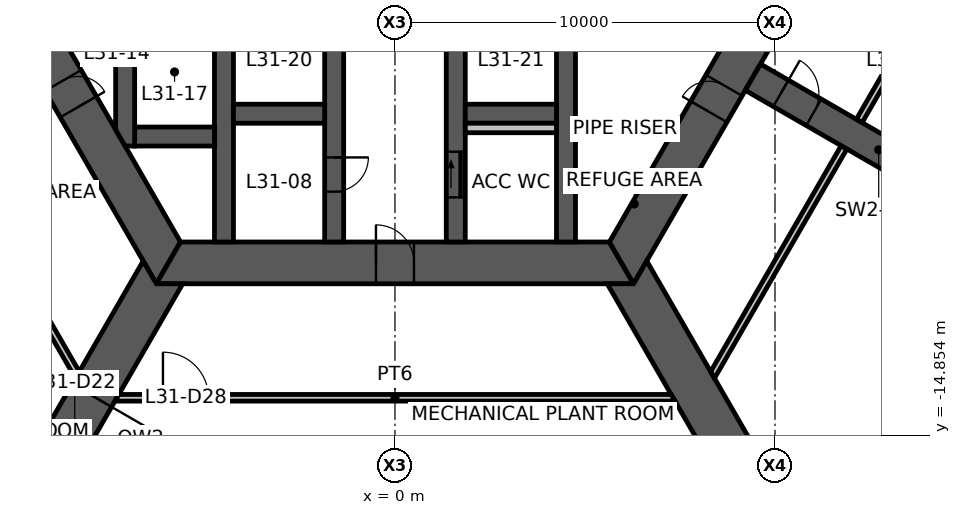
"""IFC4 building model, lengths in metres.
Left out: names, types, materials, properties, quantities, classifications, styles, units other than length and angle.
Written with IfcOpenShell. Run it as: python <this file> out.ifc"""

import sys

from ifc_helpers import new_model, si_unit, direction, frame, frame_2d, origin, place, context, subcontext, project, spatial, polyline, rectangle, outline, extrude, element, fill, save


model = new_model("IFC4")
c1 = context("Model", 3, precision=1e-05, world=origin(), true_north=direction((0.0, 1.0)))
c2 = subcontext(c1, "Body", "Model", "MODEL_VIEW")
j1 = project(units=[si_unit("LENGTHUNIT", "METRE"), si_unit("PLANEANGLEUNIT", "RADIAN")], contexts=[c1])
p1 = place(None, origin())
s1 = spatial("IfcSite", under=j1, at=p1, CompositionType="ELEMENT")
p2 = place(p1, origin())
s2 = spatial("IfcBuilding", under=s1, at=p2, CompositionType="ELEMENT")
p3 = place(p2, frame((0.0, 0.0, 123.6)))
s3 = spatial("IfcBuildingStorey", under=s2, at=p3, CompositionType="ELEMENT", Elevation=123.6)
p4 = place(p3, frame((-11.922, 0.0, 0.0), z_axis=(0.0, 0.0, 1.0), x_axis=(0.500004296715, -0.866022923061, 0.0)))
e1 = element("IfcWall", 1, at=p4, inside=s3, PredefinedType="SHEAR", context=c2, shape_type="SweptSolid", body=[
    extrude(outline(polyline([(-0.318, -0.55), (6.381, -0.55), (7.181, -0.55), (12.24, -0.55), (11.605, 0.55), (7.181, 0.55), (6.381, 0.55), (0.318, 0.55), (-0.318, -0.55)])), origin(), (0.0, 0.0, 1.0), 5.0),
])
p5 = place(p4, frame((6.381, 0.0, 0.0)))
e2 = element("IfcOpeningElement", 2, at=p5, cuts=e1, PredefinedType="OPENING", context=c2, shape_type="SweptSolid", body=[
    extrude(rectangle(XDim=0.8, YDim=2.1, at=frame_2d((0.4, 1.05))), frame((0.0, 0.56, 0.0), z_axis=(0.0, -1.0, 0.0), x_axis=(1.0, 0.0, 0.0)), (0.0, 0.0, 1.0), 1.12),
])
p6 = place(p3, frame((-5.961, -10.325, 0.0), z_axis=(0.0, 0.0, 1.0), x_axis=(1.0, 0.0, 0.0)))
e3 = element("IfcWall", 3, at=p6, inside=s3, PredefinedType="SHEAR", context=c2, shape_type="SweptSolid", body=[
    extrude(outline(polyline([(-0.318, -0.55), (5.461, -0.55), (6.461, -0.55), (12.24, -0.55), (11.605, 0.55), (6.461, 0.55), (5.461, 0.55), (0.318, 0.55), (-0.318, -0.55)])), origin(), (0.0, 0.0, 1.0), 5.0),
])
p7 = place(p6, frame((5.461, 0.0, 0.0)))
e4 = element("IfcOpeningElement", 4, at=p7, cuts=e3, PredefinedType="OPENING", context=c2, shape_type="SweptSolid", body=[
    extrude(rectangle(XDim=1.0, YDim=2.1, at=frame_2d((0.5, 1.05))), frame((0.0, 0.56, 0.0), z_axis=(0.0, -1.0, 0.0), x_axis=(1.0, 0.0, 0.0)), (0.0, 0.0, 1.0), 1.12),
])
p8 = place(p3, frame((5.961, -10.325, 0.0), z_axis=(0.0, 0.0, 1.0), x_axis=(0.500004296715, 0.866022923061, 0.0)))
e5 = element("IfcWall", 5, at=p8, inside=s3, PredefinedType="SHEAR", context=c2, shape_type="SweptSolid", body=[
    extrude(outline(polyline([(-0.318, -0.55), (4.594, -0.55), (5.394, -0.55), (12.24, -0.55), (11.605, 0.55), (5.394, 0.55), (4.594, 0.55), (0.318, 0.55), (-0.318, -0.55)])), origin(), (0.0, 0.0, 1.0), 5.0),
])
p9 = place(p8, frame((4.594, 0.0, 0.0)))
e6 = element("IfcOpeningElement", 6, at=p9, cuts=e5, PredefinedType="OPENING", context=c2, shape_type="SweptSolid", body=[
    extrude(rectangle(XDim=0.8, YDim=2.1, at=frame_2d((0.4, 1.05))), frame((0.0, 0.56, 0.0), z_axis=(0.0, -1.0, 0.0), x_axis=(1.0, 0.0, 0.0)), (0.0, 0.0, 1.0), 1.12),
])
p10 = place(p3, frame((9.418, -5.438, 0.0), z_axis=(0.0, 0.0, 1.0), x_axis=(0.866029782078, -0.499992416496, 0.0)))
e7 = element("IfcWall", 7, at=p10, inside=s3, PredefinedType="SHEAR", context=c2, shape_type="SweptSolid", body=[
    extrude(rectangle(XDim=7.646, YDim=0.8, at=frame_2d((3.823, 0.0))), origin(), (0.0, 0.0, 1.0), 5.0),
])
p11 = place(p10, frame((0.85, 0.0, 0.0)))
e8 = element("IfcOpeningElement", 8, at=p11, cuts=e7, PredefinedType="OPENING", context=c2, shape_type="SweptSolid", body=[
    extrude(rectangle(XDim=1.0, YDim=2.1, at=frame_2d((0.5, 1.05))), frame((0.0, 0.41, 0.0), z_axis=(0.0, -1.0, 0.0), x_axis=(1.0, 0.0, 0.0)), (0.0, 0.0, 1.0), 0.82),
])
p12 = place(p3, frame((-6.279, -10.875, -1.15), z_axis=(0.0, 0.0, 1.0), x_axis=(-0.50000923905, -0.866020069551, 0.0)))
e9 = element("IfcWall", 9, at=p12, inside=s3, PredefinedType="SHEAR", context=c2, shape_type="SweptSolid", body=[
    extrude(outline(polyline([(-0.346, -0.6), (3.395, -0.6), (5.195, -0.6), (7.443, -0.6), (7.443, 0.6), (5.195, 0.6), (3.395, 0.6), (-0.346, 0.6), (0.0, 0.0), (-0.346, -0.6)])), origin(), (0.0, 0.0, 1.0), 6.15),
])
p13 = place(p12, frame((3.395, 0.0, 1.15)))
e10 = element("IfcOpeningElement", 10, at=p13, cuts=e9, PredefinedType="OPENING", context=c2, shape_type="SweptSolid", body=[
    extrude(rectangle(XDim=1.8, YDim=2.4, at=frame_2d((0.9, 1.2))), frame((0.0, 0.61, 0.0), z_axis=(0.0, -1.0, 0.0), x_axis=(1.0, 0.0, 0.0)), (0.0, 0.0, 1.0), 1.22),
])
p14 = place(p3, frame((6.279, -10.875, -1.15), z_axis=(0.0, 0.0, 1.0), x_axis=(0.50000923905, -0.866020069551, 0.0)))
e11 = element("IfcWall", 11, at=p14, inside=s3, PredefinedType="SHEAR", context=c2, shape_type="SweptSolid", body=[
    extrude(outline(polyline([(-0.346, -0.6), (7.443, -0.6), (7.443, 0.6), (-0.346, 0.6), (0.0, 0.0), (-0.346, -0.6)])), origin(), (0.0, 0.0, 1.0), 6.15),
])
p15 = place(p3, frame((-1.6, -3.85, 0.0), z_axis=(0.0, 0.0, 1.0), x_axis=(0.0, -1.0, 0.0)))
e12 = element("IfcWall", 12, at=p15, inside=s3, PredefinedType="SHEAR", context=c2, shape_type="SweptSolid", body=[
    extrude(rectangle(XDim=5.925, YDim=0.5, at=frame_2d((2.962, 0.0))), origin(), (0.0, 0.0, 1.0), 5.0),
])
p16 = place(p15, frame((3.7, 0.0, 0.0)))
e13 = element("IfcOpeningElement", 13, at=p16, cuts=e12, PredefinedType="OPENING", context=c2, shape_type="SweptSolid", body=[
    extrude(rectangle(XDim=0.9, YDim=2.1, at=frame_2d((0.45, 1.05))), frame((0.0, 0.26, 0.0), z_axis=(0.0, -1.0, 0.0), x_axis=(1.0, 0.0, 0.0)), (0.0, 0.0, 1.0), 0.52),
])
p17 = place(p3, frame((1.6, -3.85, 0.0), z_axis=(0.0, 0.0, 1.0), x_axis=(0.0, -1.0, 0.0)))
e14 = element("IfcWall", 14, at=p17, inside=s3, PredefinedType="SHEAR", context=c2, shape_type="SweptSolid", body=[
    extrude(rectangle(XDim=5.925, YDim=0.5, at=frame_2d((2.962, 0.0))), origin(), (0.0, 0.0, 1.0), 5.0),
])
p18 = place(p17, frame((3.55, 0.0, 0.0)))
e15 = element("IfcOpeningElement", 15, at=p18, cuts=e14, PredefinedType="OPENING", context=c2, shape_type="SweptSolid", body=[
    extrude(rectangle(XDim=1.2, YDim=2.1, at=frame_2d((0.6, 1.05))), frame((0.0, 0.26, 0.0), z_axis=(0.0, -1.0, 0.0), x_axis=(1.0, 0.0, 0.0)), (0.0, 0.0, 1.0), 0.52),
])
for number, where, z_axis, x_axis in (
    (16, (-4.5, -3.85, 0.0), (0.0, 0.0, 1.0), (0.0, -1.0, 0.0)),
    (17, (4.5, -3.85, 0.0), (0.0, 0.0, 1.0), (0.0, -1.0, 0.0)),
):
    element("IfcWall", number, at=place(p3, frame(where, z_axis=z_axis, x_axis=x_axis)), inside=s3, PredefinedType="SHEAR", context=c2, shape_type="SweptSolid", body=[
        extrude(rectangle(XDim=5.925, YDim=0.5, at=frame_2d((2.962, 0.0))), origin(), (0.0, 0.0, 1.0), 5.0),
    ])
for number, where, z_axis, x_axis in (
    (18, (-4.25, -6.4, 0.0), (0.0, 0.0, 1.0), (1.0, 0.0, 0.0)),
    (19, (1.85, -6.4, 0.0), (0.0, 0.0, 1.0), (1.0, 0.0, 0.0)),
):
    element("IfcWall", number, at=place(p3, frame(where, z_axis=z_axis, x_axis=x_axis)), inside=s3, PredefinedType="SHEAR", context=c2, shape_type="SweptSolid", body=[
        extrude(rectangle(XDim=2.4, YDim=0.5, at=frame_2d((1.2, 0.0))), origin(), (0.0, 0.0, 1.0), 5.0),
    ])
p19 = place(p3, frame((-6.85, -7.0, 0.0), z_axis=(0.0, 0.0, 1.0), x_axis=(1.0, 0.0, 0.0)))
e20 = element("IfcWall", 20, at=p19, inside=s3, PredefinedType="SHEAR", context=c2, shape_type="SweptSolid", body=[
    extrude(rectangle(XDim=2.1, YDim=0.5, at=frame_2d((1.05, 0.0))), origin(), (0.0, 0.0, 1.0), 5.0),
])
p20 = place(p3, frame((-7.1, -3.85, 0.0), z_axis=(0.0, 0.0, 1.0), x_axis=(0.0, -1.0, 0.0)))
e21 = element("IfcWall", 21, at=p20, inside=s3, PredefinedType="SHEAR", context=c2, shape_type="SweptSolid", body=[
    extrude(outline(polyline([(0.0, -0.25), (2.969, -0.25), (3.4, 0.0), (3.4, 0.25), (0.0, 0.25), (0.0, -0.25)])), origin(), (0.0, 0.0, 1.0), 5.0),
])
p21 = place(p3, frame((1.85, -6.775, 0.0), z_axis=(0.0, 0.0, 1.0), x_axis=(1.0, 0.0, 0.0)))
e22 = element("IfcWall", 22, at=p21, inside=s3, PredefinedType="PLUMBINGWALL", context=c2, shape_type="SweptSolid", body=[
    extrude(rectangle(XDim=2.4, YDim=0.25, at=frame_2d((1.2, 0.0))), origin(), (0.0, 0.0, 1.0), 5.0),
])
p22 = place(p3, frame((-11.814, -7.288, 0.0), z_axis=(0.0, 0.0, 1.0), x_axis=(0.500005739714, -0.866022089933, 0.0)))
e23 = element("IfcWall", 23, at=p22, inside=s3, PredefinedType="PARTITIONING", context=c2, shape_type="SweptSolid", body=[
    extrude(outline(polyline([(0.0, -0.087), (1.9, -0.087), (3.1, -0.087), (6.964, -0.087), (6.863, 0.087), (3.1, 0.087), (1.9, 0.087), (0.0, 0.087), (0.0, -0.087)])), origin(), (0.0, 0.0, 1.0), 4.8),
])
p23 = place(p22, frame((1.9, 0.0, 0.0)))
e24 = element("IfcOpeningElement", 24, at=p23, cuts=e23, PredefinedType="OPENING", context=c2, shape_type="SweptSolid", body=[
    extrude(rectangle(XDim=1.2, YDim=2.1, at=frame_2d((0.6, 1.05))), frame((0.0, 0.098, 0.0), z_axis=(0.0, -1.0, 0.0), x_axis=(1.0, 0.0, 0.0)), (0.0, 0.0, 1.0), 0.195),
])
p24 = place(p3, frame((12.219, -6.587, 0.0), z_axis=(0.0, 0.0, 1.0), x_axis=(0.500005739714, 0.866022089933, 0.0)))
e25 = element("IfcWall", 25, at=p24, inside=s3, PredefinedType="PARTITIONING", context=c2, shape_type="SweptSolid", body=[
    extrude(outline(polyline([(0.0, -0.087), (1.9, -0.087), (3.1, -0.087), (6.964, -0.087), (6.863, 0.087), (3.1, 0.087), (1.9, 0.087), (0.0, 0.087), (0.0, -0.087)])), origin(), (0.0, 0.0, 1.0), 4.8),
])
p25 = place(p24, frame((1.9, 0.0, 0.0)))
e26 = element("IfcOpeningElement", 26, at=p25, cuts=e25, PredefinedType="OPENING", context=c2, shape_type="SweptSolid", body=[
    extrude(rectangle(XDim=1.2, YDim=2.1, at=frame_2d((0.6, 1.05))), frame((0.0, 0.098, 0.0), z_axis=(0.0, -1.0, 0.0), x_axis=(1.0, 0.0, 0.0)), (0.0, 0.0, 1.0), 0.195),
])
p26 = place(p3, frame((-7.318, -13.875, 0.0), z_axis=(0.0, 0.0, 1.0), x_axis=(1.0, 0.0, 0.0)))
e27 = element("IfcWall", 27, at=p26, inside=s3, PredefinedType="PARTITIONING", context=c2, shape_type="SweptSolid", body=[
    extrude(outline(polyline([(-0.051, -0.087), (1.213, -0.087), (2.413, -0.087), (14.686, -0.087), (14.585, 0.087), (2.413, 0.087), (1.213, 0.087), (0.051, 0.087), (-0.051, -0.087)])), origin(), (0.0, 0.0, 1.0), 4.8),
])
p27 = place(p26, frame((1.213, 0.0, 0.0)))
e28 = element("IfcOpeningElement", 28, at=p27, cuts=e27, PredefinedType="OPENING", context=c2, shape_type="SweptSolid", body=[
    extrude(rectangle(XDim=1.2, YDim=2.1, at=frame_2d((0.6, 1.05))), frame((0.0, 0.098, 0.0), z_axis=(0.0, -1.0, 0.0), x_axis=(1.0, 0.0, 0.0)), (0.0, 0.0, 1.0), 0.195),
])
p28 = place(p3, frame((8.357, -13.275, 0.0), z_axis=(0.0, 0.0, 1.0), x_axis=(0.500005739714, 0.866022089933, 0.0)))
e29 = element("IfcWall", 29, at=p28, inside=s3, PredefinedType="PARTITIONING", context=c2, shape_type="SweptSolid", body=[
    extrude(outline(polyline([(-0.051, -0.087), (6.913, -0.087), (6.913, 0.087), (0.051, 0.087), (-0.051, -0.087)])), origin(), (0.0, 0.0, 1.0), 4.8),
])
p29 = place(p7, origin())
e30 = element("IfcDoor", 30, at=p29, inside=s3, OperationType="SINGLE_SWING_LEFT", PredefinedType="DOOR", context=c2, shape_type="SweptSolid", body=[
    extrude(rectangle(XDim=1.0, YDim=2.1, at=frame_2d((0.5, 1.05))), frame((0.0, 0.025, 0.0), z_axis=(0.0, -1.0, 0.0), x_axis=(1.0, 0.0, 0.0)), (0.0, 0.0, 1.0), 0.05),
])
fill(e4, e30)
p30 = place(p9, origin())
e31 = element("IfcDoor", 31, at=p30, inside=s3, OperationType="SINGLE_SWING_LEFT", PredefinedType="DOOR", context=c2, shape_type="SweptSolid", body=[
    extrude(rectangle(XDim=0.8, YDim=2.1, at=frame_2d((0.4, 1.05))), frame((0.0, 0.025, 0.0), z_axis=(0.0, -1.0, 0.0), x_axis=(1.0, 0.0, 0.0)), (0.0, 0.0, 1.0), 0.05),
])
fill(e6, e31)
p31 = place(p5, origin())
e32 = element("IfcDoor", 32, at=p31, inside=s3, OperationType="SINGLE_SWING_RIGHT", PredefinedType="DOOR", context=c2, shape_type="SweptSolid", body=[
    extrude(rectangle(XDim=0.8, YDim=2.1, at=frame_2d((0.4, 1.05))), frame((0.0, 0.025, 0.0), z_axis=(0.0, -1.0, 0.0), x_axis=(1.0, 0.0, 0.0)), (0.0, 0.0, 1.0), 0.05),
])
fill(e2, e32)
p32 = place(p18, origin())
e33 = element("IfcDoor", 33, at=p32, inside=s3, OperationType="SLIDING_TO_LEFT", PredefinedType="DOOR", context=c2, shape_type="SweptSolid", body=[
    extrude(rectangle(XDim=1.2, YDim=2.1, at=frame_2d((0.6, 1.05))), frame((0.0, 0.025, 0.0), z_axis=(0.0, -1.0, 0.0), x_axis=(1.0, 0.0, 0.0)), (0.0, 0.0, 1.0), 0.05),
])
fill(e15, e33)
p33 = place(p16, origin())
e34 = element("IfcDoor", 34, at=p33, inside=s3, OperationType="SINGLE_SWING_LEFT", PredefinedType="DOOR", context=c2, shape_type="SweptSolid", body=[
    extrude(rectangle(XDim=0.9, YDim=2.1, at=frame_2d((0.45, 1.05))), frame((0.0, 0.025, 0.0), z_axis=(0.0, -1.0, 0.0), x_axis=(1.0, 0.0, 0.0)), (0.0, 0.0, 1.0), 0.05),
])
fill(e13, e34)
p34 = place(p11, origin())
e35 = element("IfcDoor", 35, at=p34, inside=s3, OperationType="SINGLE_SWING_LEFT", PredefinedType="DOOR", context=c2, shape_type="SweptSolid", body=[
    extrude(rectangle(XDim=1.0, YDim=2.1, at=frame_2d((0.5, 1.05))), frame((0.0, 0.025, 0.0), z_axis=(0.0, -1.0, 0.0), x_axis=(1.0, 0.0, 0.0)), (0.0, 0.0, 1.0), 0.05),
])
fill(e8, e35)
p35 = place(p13, origin())
e36 = element("IfcDoor", 36, at=p35, inside=s3, OperationType="DOUBLE_DOOR_SINGLE_SWING", PredefinedType="DOOR", context=c2, shape_type="SweptSolid", body=[
    extrude(rectangle(XDim=1.8, YDim=2.4, at=frame_2d((0.9, 1.2))), frame((0.0, 0.025, 0.0), z_axis=(0.0, -1.0, 0.0), x_axis=(1.0, 0.0, 0.0)), (0.0, 0.0, 1.0), 0.05),
])
fill(e10, e36)
p36 = place(p27, origin())
e37 = element("IfcDoor", 37, at=p36, inside=s3, OperationType="DOUBLE_DOOR_SINGLE_SWING", PredefinedType="DOOR", context=c2, shape_type="SweptSolid", body=[
    extrude(rectangle(XDim=1.2, YDim=2.1, at=frame_2d((0.6, 1.05))), frame((0.0, 0.025, 0.0), z_axis=(0.0, -1.0, 0.0), x_axis=(1.0, 0.0, 0.0)), (0.0, 0.0, 1.0), 0.05),
])
fill(e28, e37)
save(model, sys.argv[1])
